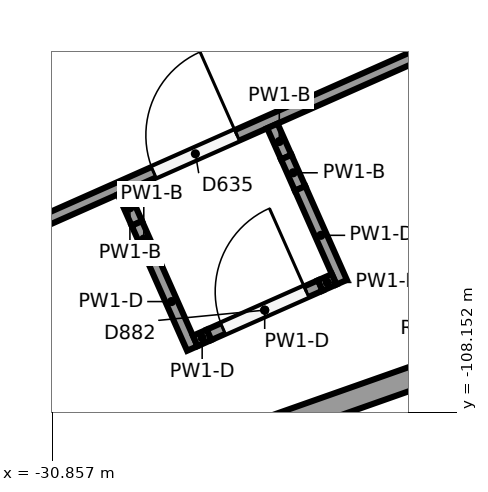
"""IFC4 building model, lengths in metres.
Left out: names, types, materials, properties, quantities, classifications, styles, units other than length and angle.
Written with IfcOpenShell. Run it as: python <this file> out.ifc"""

import sys

from ifc_helpers import new_model, si_unit, direction, frame, frame_2d, origin, place, context, subcontext, project, spatial, rectangle, extrude, element, fill, save


model = new_model("IFC4")
c1 = context("Model", 3, precision=1e-05, world=origin(), true_north=direction((0.0, 1.0)))
c2 = subcontext(c1, "Body", "Model", "MODEL_VIEW")
j1 = project(units=[si_unit("LENGTHUNIT", "METRE"), si_unit("PLANEANGLEUNIT", "RADIAN")], contexts=[c1])
p1 = place(None, origin())
s1 = spatial("IfcSite", under=j1, at=p1, CompositionType="ELEMENT")
p2 = place(p1, origin())
s2 = spatial("IfcBuilding", under=s1, at=p2, CompositionType="ELEMENT")
p3 = place(p2, origin())
s3 = spatial("IfcBuildingStorey", under=s2, at=p3, CompositionType="ELEMENT", Elevation=0.0)
p4 = place(p3, frame((-23.377, -106.733, 0.0), z_axis=(0.0, 0.0, 1.0), x_axis=(-0.943227349695, -0.332147808646, 0.0)))
e1 = element("IfcWall", 1, at=p4, inside=s3, PredefinedType="SOLIDWALL", context=c2, shape_type="SweptSolid", body=[
    extrude(rectangle(XDim=5.528, YDim=0.3, at=frame_2d((2.764, 0.0))), origin(), (0.0, 0.0, 1.0), 4.85),
])
p5 = place(p3, frame((-23.411, -98.782, 0.0), z_axis=(0.0, 0.0, 1.0), x_axis=(-0.914140506485, -0.405397501722, 0.0)))
e2 = element("IfcWall", 2, at=p5, inside=s3, PredefinedType="SOLIDWALL", context=c2, shape_type="SweptSolid", body=[
    extrude(rectangle(XDim=15.625, YDim=0.3, at=frame_2d((7.812, 0.0))), origin(), (0.0, 0.0, 1.0), 4.85),
])
p6 = place(p3, frame((-38.388, -108.925, 0.0), z_axis=(0.0, 0.0, 1.0), x_axis=(0.914139898556, 0.405398872555, 0.0)))
e3 = element("IfcWall", 3, at=p6, inside=s3, PredefinedType="PARTITIONING", context=c2, shape_type="SweptSolid", body=[
    extrude(rectangle(XDim=13.846, YDim=0.15, at=frame_2d((6.923, 0.0))), origin(), (0.0, 0.0, 1.0), 4.85),
])
p7 = place(p6, frame((9.7, 0.0, 0.0)))
e4 = element("IfcOpeningElement", 4, at=p7, cuts=e3, PredefinedType="OPENING", context=c2, shape_type="SweptSolid", body=[
    extrude(rectangle(XDim=1.2, YDim=2.1, at=frame_2d((0.6, 1.05))), frame((0.0, 0.085, 0.0), z_axis=(0.0, -1.0, 0.0), x_axis=(1.0, 0.0, 0.0)), (0.0, 0.0, 1.0), 0.17),
])
for number, where, z_axis, x_axis in (
    (5, (-29.925, -105.254, 0.0), (0.0, 0.0, 1.0), (0.405, -0.914, 0.0)),
    (6, (-29.742, -105.665, 0.0), (0.0, 0.0, 1.0), (0.405, -0.914, 0.0)),
):
    element("IfcWall", number, at=place(p3, frame(where, z_axis=z_axis, x_axis=x_axis)), inside=s3, PredefinedType="PARTITIONING", context=c2, shape_type="SweptSolid", body=[
        extrude(rectangle(XDim=0.45, YDim=0.15, at=frame_2d((0.225, 0.0))), origin(), (0.0, 0.0, 1.0), 4.85),
    ])
p8 = place(p3, frame((-29.56, -106.076, 0.0), z_axis=(0.0, 0.0, 1.0), x_axis=(0.405500676078, -0.914094744379, 0.0)))
e7 = element("IfcWall", 7, at=p8, inside=s3, PredefinedType="PARTITIONING", context=c2, shape_type="SweptSolid", body=[
    extrude(rectangle(XDim=1.35, YDim=0.15, at=frame_2d((0.675, 0.0))), origin(), (0.0, 0.0, 1.0), 6.1),
])
for number, where, z_axis, x_axis in (
    (8, (-27.959, -104.382, 0.0), (0.0, 0.0, 1.0), (0.405, -0.914, 0.0)),
    (9, (-27.777, -104.793, 0.0), (0.0, 0.0, 1.0), (0.406, -0.914, 0.0)),
):
    element("IfcWall", number, at=place(p3, frame(where, z_axis=z_axis, x_axis=x_axis)), inside=s3, PredefinedType="PARTITIONING", context=c2, shape_type="SweptSolid", body=[
        extrude(rectangle(XDim=0.45, YDim=0.15, at=frame_2d((0.225, 0.0))), origin(), (0.0, 0.0, 1.0), 4.85),
    ])
p9 = place(p3, frame((-27.594, -105.205, 0.0), z_axis=(0.0, 0.0, 1.0), x_axis=(0.405282518143, -0.914191490054, 0.0)))
e10 = element("IfcWall", 10, at=p9, inside=s3, PredefinedType="PARTITIONING", context=c2, shape_type="SweptSolid", body=[
    extrude(rectangle(XDim=1.35, YDim=0.15, at=frame_2d((0.675, 0.0))), origin(), (0.0, 0.0, 1.0), 6.1),
])
p10 = place(p3, frame((-28.975, -107.211, 0.0), z_axis=(0.0, 0.0, 1.0), x_axis=(0.914213764774, 0.405232269566, 0.0)))
e11 = element("IfcWall", 11, at=p10, inside=s3, PredefinedType="PARTITIONING", context=c2, shape_type="SweptSolid", body=[
    extrude(rectangle(XDim=0.2, YDim=0.15, at=frame_2d((0.1, 0.0))), origin(), (0.0, 0.0, 1.0), 6.1),
])
p11 = place(p3, frame((-28.792, -107.13, 0.0), z_axis=(0.0, 0.0, 1.0), x_axis=(0.914132162185, 0.405416316963, 0.0)))
e12 = element("IfcWall", 12, at=p11, inside=s3, PredefinedType="PARTITIONING", context=c2, shape_type="SweptSolid", body=[
    extrude(rectangle(XDim=1.6, YDim=0.15, at=frame_2d((0.8, 0.0))), origin(), (0.0, 0.0, 1.0), 6.1),
])
p12 = place(p11, frame((0.2, 0.0, 0.0)))
e13 = element("IfcOpeningElement", 13, at=p12, cuts=e12, PredefinedType="OPENING", context=c2, shape_type="SweptSolid", body=[
    extrude(rectangle(XDim=1.2, YDim=2.1, at=frame_2d((0.6, 1.05))), frame((0.0, 0.085, 0.0), z_axis=(0.0, -1.0, 0.0), x_axis=(1.0, 0.0, 0.0)), (0.0, 0.0, 1.0), 0.17),
])
p13 = place(p3, frame((-27.329, -106.482, 0.0), z_axis=(0.0, 0.0, 1.0), x_axis=(0.914213764774, 0.405232269566, 0.0)))
e14 = element("IfcWall", 14, at=p13, inside=s3, PredefinedType="PARTITIONING", context=c2, shape_type="SweptSolid", body=[
    extrude(rectangle(XDim=0.2, YDim=0.15, at=frame_2d((0.1, 0.0))), origin(), (0.0, 0.0, 1.0), 6.1),
])
p14 = place(p7, origin())
e15 = element("IfcDoor", 15, at=p14, inside=s3, OperationType="SINGLE_SWING_RIGHT", PredefinedType="DOOR", context=c2, shape_type="SweptSolid", body=[
    extrude(rectangle(XDim=1.2, YDim=2.1, at=frame_2d((0.6, 1.05))), frame((0.0, 0.025, 0.0), z_axis=(0.0, -1.0, 0.0), x_axis=(1.0, 0.0, 0.0)), (0.0, 0.0, 1.0), 0.05),
])
fill(e4, e15)
p15 = place(p12, origin())
e16 = element("IfcDoor", 16, at=p15, inside=s3, OperationType="SINGLE_SWING_RIGHT", PredefinedType="DOOR", context=c2, shape_type="SweptSolid", body=[
    extrude(rectangle(XDim=1.2, YDim=2.1, at=frame_2d((0.6, 1.05))), frame((0.0, 0.025, 0.0), z_axis=(0.0, -1.0, 0.0), x_axis=(1.0, 0.0, 0.0)), (0.0, 0.0, 1.0), 0.05),
])
fill(e13, e16)
save(model, sys.argv[1])
